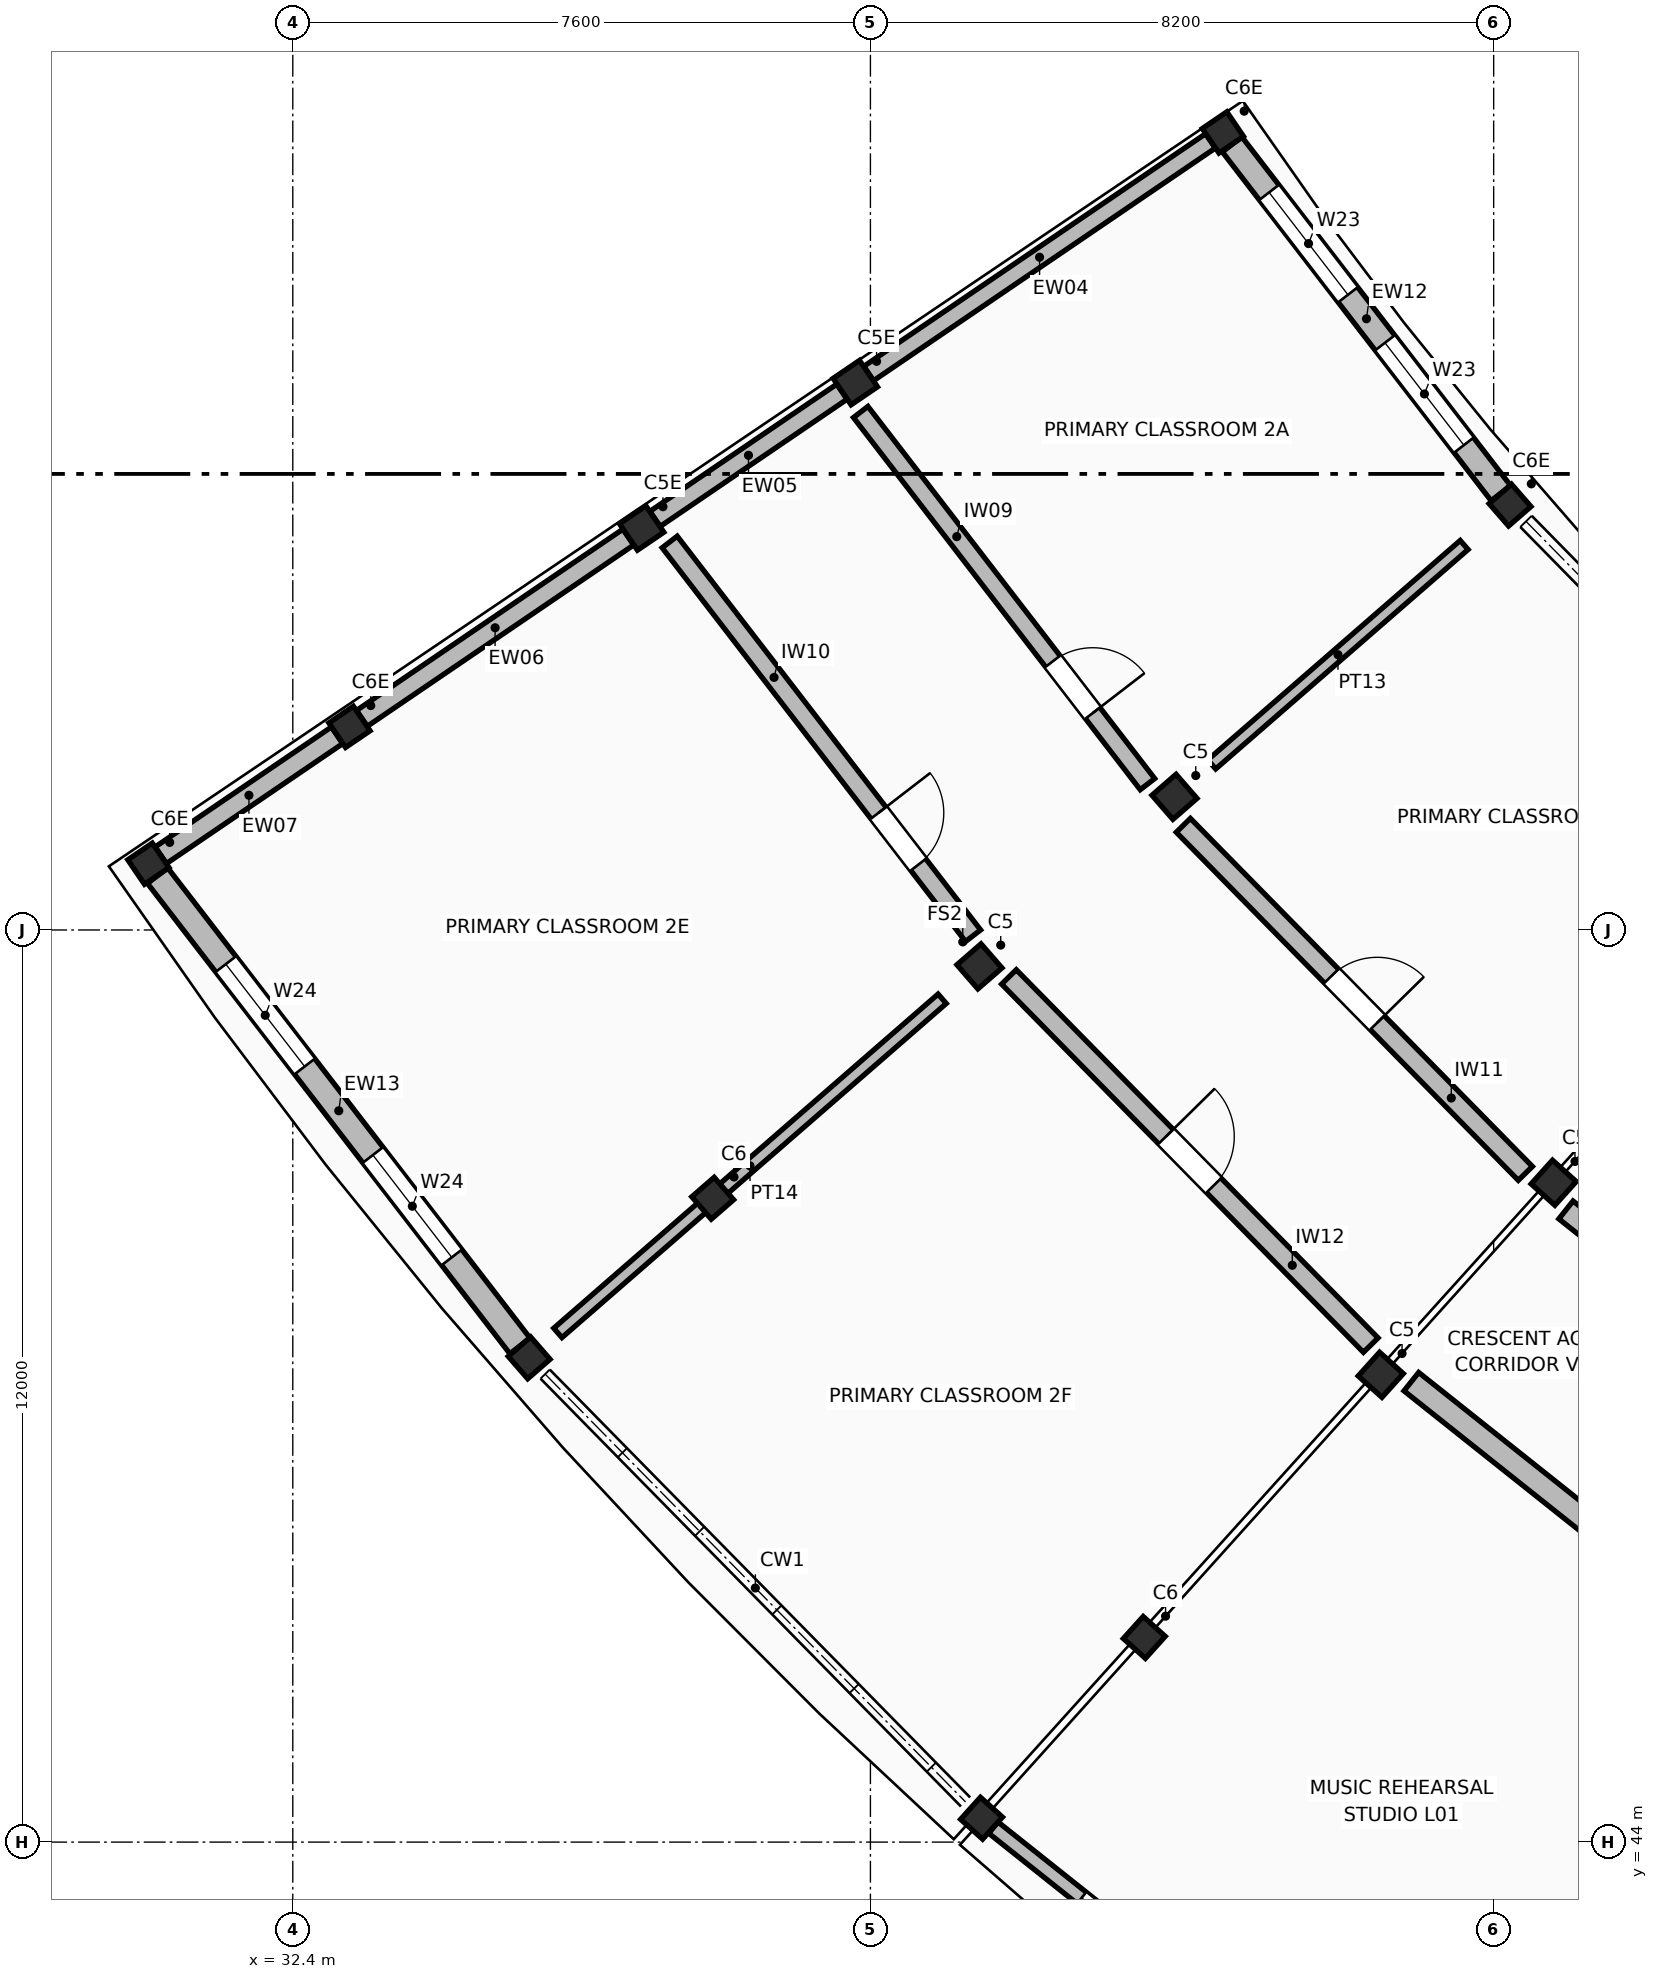
"""IFC4 building model, lengths in metres.
Left out: names, types, materials, properties, quantities, classifications, styles, units other than length and angle.
Written with IfcOpenShell. Run it as: python <this file> out.ifc"""

import sys

from ifc_helpers import new_model, si_unit, direction, frame, frame_2d, origin, origin_2d, place, context, subcontext, project, spatial, rectangle, extrude, element, fill, save


model = new_model("IFC4")
c1 = context("Model", 3, precision=1e-05, world=origin(), true_north=direction((0.0, 1.0)))
c2 = subcontext(c1, "Body", "Model", "MODEL_VIEW")
j1 = project(units=[si_unit("LENGTHUNIT", "METRE"), si_unit("PLANEANGLEUNIT", "RADIAN")], contexts=[c1])
p1 = place(None, origin())
s1 = spatial("IfcSite", under=j1, at=p1, CompositionType="ELEMENT")
p2 = place(p1, origin())
s2 = spatial("IfcBuilding", under=s1, at=p2, CompositionType="ELEMENT")
p3 = place(p2, frame((0.0, 0.0, 4.42)))
s3 = spatial("IfcBuildingStorey", under=s2, at=p3, CompositionType="ELEMENT", Elevation=4.42)
p4 = place(p3, frame((44.637, 66.492, 0.0), z_axis=(0.0, 0.0, 1.0), x_axis=(-0.826786154745, -0.562516359159, 0.0)))
e1 = element("IfcColumn", 1, at=p4, inside=s3, PredefinedType="COLUMN", context=c2, shape_type="SweptSolid", body=[
    extrude(rectangle(XDim=0.39, YDim=0.39, at=origin_2d()), origin(), (0.0, 0.0, 1.0), 3.74),
])
for number, where, z_axis, x_axis in (
    (2, (39.801, 63.201, 0.0), (0.0, 0.0, 1.0), (-0.827, -0.563, 0.0)),
    (3, (36.99, 61.288, 0.0), (0.0, 0.0, 1.0), (-0.827, -0.563, 0.0)),
):
    element("IfcColumn", number, at=place(p3, frame(where, z_axis=z_axis, x_axis=x_axis)), inside=s3, PredefinedType="COLUMN", context=c2, shape_type="SweptSolid", body=[
        extrude(rectangle(XDim=0.42, YDim=0.42, at=origin_2d()), origin(), (0.0, 0.0, 1.0), 3.74),
    ])
for number, where, z_axis, x_axis in (
    (4, (33.146, 58.672, 0.0), (0.0, 0.0, 1.0), (-0.827, -0.563, 0.0)),
    (5, (30.5, 56.872, 0.0), (0.0, 0.0, 1.0), (-0.827, -0.563, 0.0)),
    (6, (48.416, 61.59, 0.0), (0.0, 0.0, 1.0), (-0.755, -0.656, 0.0)),
):
    element("IfcColumn", number, at=place(p3, frame(where, z_axis=z_axis, x_axis=x_axis)), inside=s3, PredefinedType="COLUMN", context=c2, shape_type="SweptSolid", body=[
        extrude(rectangle(XDim=0.39, YDim=0.39, at=origin_2d()), origin(), (0.0, 0.0, 1.0), 3.74),
    ])
for number, where, z_axis, x_axis in (
    (7, (44.0, 57.752, 0.0), (0.0, 0.0, 1.0), (-0.755, -0.656, 0.0)),
    (8, (41.434, 55.521, 0.0), (0.0, 0.0, 1.0), (-0.755, -0.656, 0.0)),
):
    element("IfcColumn", number, at=place(p3, frame(where, z_axis=z_axis, x_axis=x_axis)), inside=s3, PredefinedType="COLUMN", context=c2, shape_type="SweptSolid", body=[
        extrude(rectangle(XDim=0.42, YDim=0.42, at=origin_2d()), origin(), (0.0, 0.0, 1.0), 3.74),
    ])
for number, where, z_axis, x_axis in (
    (9, (37.925, 52.47, 0.0), (0.0, 0.0, 1.0), (-0.755, -0.656, 0.0)),
    (10, (35.51, 50.371, 0.0), (0.0, 0.0, 1.0), (-0.755, -0.656, 0.0)),
):
    element("IfcColumn", number, at=place(p3, frame(where, z_axis=z_axis, x_axis=x_axis)), inside=s3, PredefinedType="COLUMN", context=c2, shape_type="SweptSolid", body=[
        extrude(rectangle(XDim=0.39, YDim=0.39, at=origin_2d()), origin(), (0.0, 0.0, 1.0), 3.74),
    ])
for number, where, z_axis, x_axis in (
    (11, (48.99, 52.675, 0.0), (0.0, 0.0, 1.0), (-0.669, -0.743, 0.0)),
    (12, (46.715, 50.148, 0.0), (0.0, 0.0, 1.0), (-0.669, -0.743, 0.0)),
):
    element("IfcColumn", number, at=place(p3, frame(where, z_axis=z_axis, x_axis=x_axis)), inside=s3, PredefinedType="COLUMN", context=c2, shape_type="SweptSolid", body=[
        extrude(rectangle(XDim=0.42, YDim=0.42, at=origin_2d()), origin(), (0.0, 0.0, 1.0), 3.74),
    ])
for number, where, z_axis, x_axis in (
    (13, (43.603, 46.692, 0.0), (0.0, 0.0, 1.0), (-0.669, -0.743, 0.0)),
    (14, (41.462, 44.314, 0.0), (0.0, 0.0, 1.0), (-0.669, -0.743, 0.0)),
):
    element("IfcColumn", number, at=place(p3, frame(where, z_axis=z_axis, x_axis=x_axis)), inside=s3, PredefinedType="COLUMN", context=c2, shape_type="SweptSolid", body=[
        extrude(rectangle(XDim=0.39, YDim=0.39, at=origin_2d()), origin(), (0.0, 0.0, 1.0), 3.74),
    ])
p5 = place(p3, frame((44.758, 66.335, 0.0), z_axis=(0.0, 0.0, 1.0), x_axis=(0.610413133261, -0.792083206957, 0.0)))
e15 = element("IfcWall", 15, at=p5, inside=s3, PredefinedType="STANDARD", context=c2, shape_type="SweptSolid", body=[
    extrude(rectangle(XDim=5.793, YDim=0.324, at=frame_2d((2.897, 0.0))), origin(), (0.0, 0.0, 1.0), 2.78),
])
p6 = place(p5, frame((0.798, 0.0, 0.95)))
e16 = element("IfcOpeningElement", 16, at=p6, cuts=e15, PredefinedType="OPENING", context=c2, shape_type="SweptSolid", body=[
    extrude(rectangle(XDim=1.7, YDim=1.45, at=frame_2d((0.85, 0.725))), frame((0.0, 0.172, 0.0), z_axis=(0.0, -1.0, 0.0), x_axis=(1.0, 0.0, 0.0)), (0.0, 0.0, 1.0), 0.344),
])
p7 = place(p5, frame((3.296, 0.0, 0.95)))
e17 = element("IfcOpeningElement", 17, at=p7, cuts=e15, PredefinedType="OPENING", context=c2, shape_type="SweptSolid", body=[
    extrude(rectangle(XDim=1.7, YDim=1.45, at=frame_2d((0.85, 0.725))), frame((0.0, 0.172, 0.0), z_axis=(0.0, -1.0, 0.0), x_axis=(1.0, 0.0, 0.0)), (0.0, 0.0, 1.0), 0.344),
])
p8 = place(p3, frame((30.621, 56.715, 0.0), z_axis=(0.0, 0.0, 1.0), x_axis=(0.610390223599, -0.792100861592, 0.0)))
e18 = element("IfcWall", 18, at=p8, inside=s3, PredefinedType="STANDARD", context=c2, shape_type="SweptSolid", body=[
    extrude(rectangle(XDim=7.812, YDim=0.336, at=frame_2d((3.906, 0.0))), origin(), (0.0, 0.0, 1.0), 2.78),
])
p9 = place(p8, frame((1.47, 0.0, 0.95)))
e19 = element("IfcOpeningElement", 19, at=p9, cuts=e18, PredefinedType="OPENING", context=c2, shape_type="SweptSolid", body=[
    extrude(rectangle(XDim=1.7, YDim=1.6, at=frame_2d((0.85, 0.8))), frame((0.0, 0.178, 0.0), z_axis=(0.0, -1.0, 0.0), x_axis=(1.0, 0.0, 0.0)), (0.0, 0.0, 1.0), 0.356),
])
p10 = place(p8, frame((4.641, 0.0, 0.95)))
e20 = element("IfcOpeningElement", 20, at=p10, cuts=e18, PredefinedType="OPENING", context=c2, shape_type="SweptSolid", body=[
    extrude(rectangle(XDim=1.7, YDim=1.6, at=frame_2d((0.85, 0.8))), frame((0.0, 0.178, 0.0), z_axis=(0.0, -1.0, 0.0), x_axis=(1.0, 0.0, 0.0)), (0.0, 0.0, 1.0), 0.356),
])
p11 = place(p3, frame((41.617, 44.191, 0.0), z_axis=(0.0, 0.0, 1.0), x_axis=(0.782610403329, -0.62251181242, 0.0)))
e21 = element("IfcWall", 21, at=p11, inside=s3, PredefinedType="STANDARD", context=c2, shape_type="SweptSolid", body=[
    extrude(rectangle(XDim=8.096, YDim=0.192, at=frame_2d((4.048, 0.0))), origin(), (0.0, 0.0, 1.0), 2.78),
])
p12 = place(p11, frame((1.485, 0.0, 0.95)))
e22 = element("IfcOpeningElement", 22, at=p12, cuts=e21, PredefinedType="OPENING", context=c2, shape_type="SweptSolid", body=[
    extrude(rectangle(XDim=1.82, YDim=1.3, at=frame_2d((0.91, 0.65))), frame((0.0, 0.106, 0.0), z_axis=(0.0, -1.0, 0.0), x_axis=(1.0, 0.0, 0.0)), (0.0, 0.0, 1.0), 0.212),
])
p13 = place(p11, frame((4.791, 0.0, 0.95)))
e23 = element("IfcOpeningElement", 23, at=p13, cuts=e21, PredefinedType="OPENING", context=c2, shape_type="SweptSolid", body=[
    extrude(rectangle(XDim=1.82, YDim=1.3, at=frame_2d((0.91, 0.65))), frame((0.0, 0.106, 0.0), z_axis=(0.0, -1.0, 0.0), x_axis=(1.0, 0.0, 0.0)), (0.0, 0.0, 1.0), 0.212),
])
p14 = place(p3, frame((44.474, 66.381, 0.0), z_axis=(0.0, 0.0, 1.0), x_axis=(-0.826743616666, -0.562578876516, 0.0)))
e24 = element("IfcWall", 24, at=p14, inside=s3, PredefinedType="STANDARD", context=c2, shape_type="SweptSolid", body=[
    extrude(rectangle(XDim=5.439, YDim=0.228, at=frame_2d((2.719, 0.0))), origin(), (0.0, 0.0, 1.0), 2.78),
])
p15 = place(p3, frame((39.625, 63.081, 0.0), z_axis=(0.0, 0.0, 1.0), x_axis=(-0.826746288828, -0.562574949592, 0.0)))
e25 = element("IfcWall", 25, at=p15, inside=s3, PredefinedType="STANDARD", context=c2, shape_type="SweptSolid", body=[
    extrude(rectangle(XDim=2.974, YDim=0.24, at=frame_2d((1.487, 0.0))), origin(), (0.0, 0.0, 1.0), 2.78),
])
p16 = place(p3, frame((36.814, 61.169, 0.0), z_axis=(0.0, 0.0, 1.0), x_axis=(-0.826749711991, -0.562569918964, 0.0)))
e26 = element("IfcWall", 26, at=p16, inside=s3, PredefinedType="STANDARD", context=c2, shape_type="SweptSolid", body=[
    extrude(rectangle(XDim=4.239, YDim=0.252, at=frame_2d((2.12, 0.0))), origin(), (0.0, 0.0, 1.0), 2.78),
])
p17 = place(p3, frame((32.982, 58.561, 0.0), z_axis=(0.0, 0.0, 1.0), x_axis=(-0.826748315521, -0.562571971204, 0.0)))
e27 = element("IfcWall", 27, at=p17, inside=s3, PredefinedType="STANDARD", context=c2, shape_type="SweptSolid", body=[
    extrude(rectangle(XDim=2.804, YDim=0.264, at=frame_2d((1.402, 0.0))), origin(), (0.0, 0.0, 1.0), 2.78),
])
p18 = place(p3, frame((39.872, 62.815, 0.0), z_axis=(0.0, 0.0, 1.0), x_axis=(0.610376740954, -0.79211125109, 0.0)))
e28 = element("IfcWall", 28, at=p18, inside=s3, PredefinedType="STANDARD", context=c2, shape_type="SweptSolid", body=[
    extrude(rectangle(XDim=6.181, YDim=0.24, at=frame_2d((3.09, 0.0))), origin(), (0.0, 0.0, 1.0), 2.75),
])
p19 = place(p18, frame((4.141, 0.0, 0.0)))
e29 = element("IfcOpeningElement", 29, at=p19, cuts=e28, PredefinedType="OPENING", context=c2, shape_type="SweptSolid", body=[
    extrude(rectangle(XDim=0.86, YDim=2.12, at=frame_2d((0.43, 1.06))), frame((0.0, 0.13, 0.0), z_axis=(0.0, -1.0, 0.0), x_axis=(1.0, 0.0, 0.0)), (0.0, 0.0, 1.0), 0.26),
])
p20 = place(p3, frame((37.359, 61.104, 0.0), z_axis=(0.0, 0.0, 1.0), x_axis=(0.610378079511, -0.792110219637, 0.0)))
e30 = element("IfcWall", 30, at=p20, inside=s3, PredefinedType="STANDARD", context=c2, shape_type="SweptSolid", body=[
    extrude(rectangle(XDim=6.54, YDim=0.25, at=frame_2d((3.27, 0.0))), origin(), (0.0, 0.0, 1.0), 2.75),
])
p21 = place(p20, frame((4.5, 0.0, 0.0)))
e31 = element("IfcOpeningElement", 31, at=p21, cuts=e30, PredefinedType="OPENING", context=c2, shape_type="SweptSolid", body=[
    extrude(rectangle(XDim=0.86, YDim=2.18, at=frame_2d((0.43, 1.09))), frame((0.0, 0.135, 0.0), z_axis=(0.0, -1.0, 0.0), x_axis=(1.0, 0.0, 0.0)), (0.0, 0.0, 1.0), 0.27),
])
p22 = place(p3, frame((44.117, 57.377, 0.0), z_axis=(0.0, 0.0, 1.0), x_axis=(0.700900509406, -0.713259052459, 0.0)))
e32 = element("IfcWall", 32, at=p22, inside=s3, PredefinedType="STANDARD", context=c2, shape_type="SweptSolid", body=[
    extrude(rectangle(XDim=6.42, YDim=0.26, at=frame_2d((3.21, 0.0))), origin(), (0.0, 0.0, 1.0), 2.75),
])
p23 = place(p22, frame((2.78, 0.0, 0.0)))
e33 = element("IfcOpeningElement", 33, at=p23, cuts=e32, PredefinedType="OPENING", context=c2, shape_type="SweptSolid", body=[
    extrude(rectangle(XDim=0.86, YDim=2.24, at=frame_2d((0.43, 1.12))), frame((0.0, 0.14, 0.0), z_axis=(0.0, -1.0, 0.0), x_axis=(1.0, 0.0, 0.0)), (0.0, 0.0, 1.0), 0.28),
])
p24 = place(p3, frame((41.823, 55.383, 0.0), z_axis=(0.0, 0.0, 1.0), x_axis=(0.700914816473, -0.713244993006, 0.0)))
e34 = element("IfcWall", 34, at=p24, inside=s3, PredefinedType="STANDARD", context=c2, shape_type="SweptSolid", body=[
    extrude(rectangle(XDim=6.792, YDim=0.27, at=frame_2d((3.396, 0.0))), origin(), (0.0, 0.0, 1.0), 2.75),
])
p25 = place(p24, frame((2.946, 0.0, 0.0)))
e35 = element("IfcOpeningElement", 35, at=p25, cuts=e34, PredefinedType="OPENING", context=c2, shape_type="SweptSolid", body=[
    extrude(rectangle(XDim=0.9, YDim=2.06, at=frame_2d((0.45, 1.03))), frame((0.0, 0.145, 0.0), z_axis=(0.0, -1.0, 0.0), x_axis=(1.0, 0.0, 0.0)), (0.0, 0.0, 1.0), 0.29),
])
p26 = place(p3, frame((47.812, 61.065, 0.0), z_axis=(0.0, 0.0, 1.0), x_axis=(-0.75471062989, -0.656057821484, 0.0)))
e36 = element("IfcWall", 36, at=p26, inside=s3, PredefinedType="PARTITIONING", context=c2, shape_type="SweptSolid", body=[
    extrude(rectangle(XDim=4.4, YDim=0.158, at=frame_2d((2.2, 0.0))), origin(), (0.0, 0.0, 1.0), 2.75),
])
p27 = place(p3, frame((40.944, 55.095, 0.0), z_axis=(0.0, 0.0, 1.0), x_axis=(-0.754721612631, -0.656045187032, 0.0)))
e37 = element("IfcWall", 37, at=p27, inside=s3, PredefinedType="PARTITIONING", context=c2, shape_type="SweptSolid", body=[
    extrude(rectangle(XDim=6.7, YDim=0.164, at=frame_2d((3.35, 0.0))), origin(), (0.0, 0.0, 1.0), 2.75),
])
p28 = place(p3, frame((49.151, 52.317, 0.0), z_axis=(0.0, 0.0, 1.0), x_axis=(0.782605685559, -0.622517743467, 0.0)))
e38 = element("IfcWall", 38, at=p28, inside=s3, PredefinedType="STANDARD", context=c2, shape_type="SweptSolid", body=[
    extrude(rectangle(XDim=6.42, YDim=0.3, at=frame_2d((3.21, 0.0))), origin(), (0.0, 0.0, 1.0), 2.75),
])
p29 = place(p28, frame((2.76, 0.0, 0.0)))
e39 = element("IfcOpeningElement", 39, at=p29, cuts=e38, PredefinedType="OPENING", context=c2, shape_type="SweptSolid", body=[
    extrude(rectangle(XDim=0.9, YDim=2.12, at=frame_2d((0.45, 1.06))), frame((0.0, 0.16, 0.0), z_axis=(0.0, -1.0, 0.0), x_axis=(1.0, 0.0, 0.0)), (0.0, 0.0, 1.0), 0.32),
])
p30 = place(p3, frame((47.117, 50.058, 0.0), z_axis=(0.0, 0.0, 1.0), x_axis=(0.782615780998, -0.622505051653, 0.0)))
e40 = element("IfcWall", 40, at=p30, inside=s3, PredefinedType="STANDARD", context=c2, shape_type="SweptSolid", body=[
    extrude(rectangle(XDim=6.792, YDim=0.31, at=frame_2d((3.396, 0.0))), origin(), (0.0, 0.0, 1.0), 2.75),
])
p31 = place(p30, frame((2.946, 0.0, 0.0)))
e41 = element("IfcOpeningElement", 41, at=p31, cuts=e40, PredefinedType="OPENING", context=c2, shape_type="SweptSolid", body=[
    extrude(rectangle(XDim=0.9, YDim=2.18, at=frame_2d((0.45, 1.09))), frame((0.0, 0.165, 0.0), z_axis=(0.0, -1.0, 0.0), x_axis=(1.0, 0.0, 0.0)), (0.0, 0.0, 1.0), 0.33),
])
p32 = place(p6, origin())
e42 = element("IfcWindow", 42, at=p32, inside=s3, PartitioningType="SINGLE_PANEL", PredefinedType="WINDOW", context=c2, shape_type="SweptSolid", body=[
    extrude(rectangle(XDim=1.7, YDim=1.45, at=frame_2d((0.85, 0.725))), frame((0.0, 0.03, 0.0), z_axis=(0.0, -1.0, 0.0), x_axis=(1.0, 0.0, 0.0)), (0.0, 0.0, 1.0), 0.06),
])
fill(e16, e42)
p33 = place(p7, origin())
e43 = element("IfcWindow", 43, at=p33, inside=s3, PartitioningType="SINGLE_PANEL", PredefinedType="WINDOW", context=c2, shape_type="SweptSolid", body=[
    extrude(rectangle(XDim=1.7, YDim=1.45, at=frame_2d((0.85, 0.725))), frame((0.0, 0.03, 0.0), z_axis=(0.0, -1.0, 0.0), x_axis=(1.0, 0.0, 0.0)), (0.0, 0.0, 1.0), 0.06),
])
fill(e17, e43)
p34 = place(p9, origin())
e44 = element("IfcWindow", 44, at=p34, inside=s3, PartitioningType="SINGLE_PANEL", PredefinedType="WINDOW", context=c2, shape_type="SweptSolid", body=[
    extrude(rectangle(XDim=1.7, YDim=1.6, at=frame_2d((0.85, 0.8))), frame((0.0, 0.03, 0.0), z_axis=(0.0, -1.0, 0.0), x_axis=(1.0, 0.0, 0.0)), (0.0, 0.0, 1.0), 0.06),
])
fill(e19, e44)
p35 = place(p10, origin())
e45 = element("IfcWindow", 45, at=p35, inside=s3, PartitioningType="SINGLE_PANEL", PredefinedType="WINDOW", context=c2, shape_type="SweptSolid", body=[
    extrude(rectangle(XDim=1.7, YDim=1.6, at=frame_2d((0.85, 0.8))), frame((0.0, 0.03, 0.0), z_axis=(0.0, -1.0, 0.0), x_axis=(1.0, 0.0, 0.0)), (0.0, 0.0, 1.0), 0.06),
])
fill(e20, e45)
p36 = place(p12, origin())
e46 = element("IfcWindow", 46, at=p36, inside=s3, PartitioningType="SINGLE_PANEL", PredefinedType="WINDOW", context=c2, shape_type="SweptSolid", body=[
    extrude(rectangle(XDim=1.82, YDim=1.3, at=frame_2d((0.91, 0.65))), frame((0.0, 0.03, 0.0), z_axis=(0.0, -1.0, 0.0), x_axis=(1.0, 0.0, 0.0)), (0.0, 0.0, 1.0), 0.06),
])
fill(e22, e46)
p37 = place(p19, frame((0.86, 0.0, 0.0), z_axis=(0.0, 0.0, 1.0), x_axis=(-1.0, 0.0, 0.0)))
e47 = element("IfcDoor", 47, at=p37, inside=s3, OperationType="SINGLE_SWING_RIGHT", PredefinedType="DOOR", context=c2, shape_type="SweptSolid", body=[
    extrude(rectangle(XDim=0.86, YDim=2.12, at=frame_2d((0.43, 1.06))), frame((0.0, 0.025, 0.0), z_axis=(0.0, -1.0, 0.0), x_axis=(1.0, 0.0, 0.0)), (0.0, 0.0, 1.0), 0.05),
])
fill(e29, e47)
p38 = place(p21, origin())
e48 = element("IfcDoor", 48, at=p38, inside=s3, OperationType="SINGLE_SWING_LEFT", PredefinedType="DOOR", context=c2, shape_type="SweptSolid", body=[
    extrude(rectangle(XDim=0.86, YDim=2.18, at=frame_2d((0.43, 1.09))), frame((0.0, 0.025, 0.0), z_axis=(0.0, -1.0, 0.0), x_axis=(1.0, 0.0, 0.0)), (0.0, 0.0, 1.0), 0.05),
])
fill(e31, e48)
p39 = place(p23, frame((0.86, 0.0, 0.0), z_axis=(0.0, 0.0, 1.0), x_axis=(-1.0, 0.0, 0.0)))
e49 = element("IfcDoor", 49, at=p39, inside=s3, OperationType="SINGLE_SWING_RIGHT", PredefinedType="DOOR", context=c2, shape_type="SweptSolid", body=[
    extrude(rectangle(XDim=0.86, YDim=2.24, at=frame_2d((0.43, 1.12))), frame((0.0, 0.025, 0.0), z_axis=(0.0, -1.0, 0.0), x_axis=(1.0, 0.0, 0.0)), (0.0, 0.0, 1.0), 0.05),
])
fill(e33, e49)
p40 = place(p25, origin())
e50 = element("IfcDoor", 50, at=p40, inside=s3, OperationType="SINGLE_SWING_LEFT", PredefinedType="DOOR", context=c2, shape_type="SweptSolid", body=[
    extrude(rectangle(XDim=0.9, YDim=2.06, at=frame_2d((0.45, 1.03))), frame((0.0, 0.025, 0.0), z_axis=(0.0, -1.0, 0.0), x_axis=(1.0, 0.0, 0.0)), (0.0, 0.0, 1.0), 0.05),
])
fill(e35, e50)
save(model, sys.argv[1])
